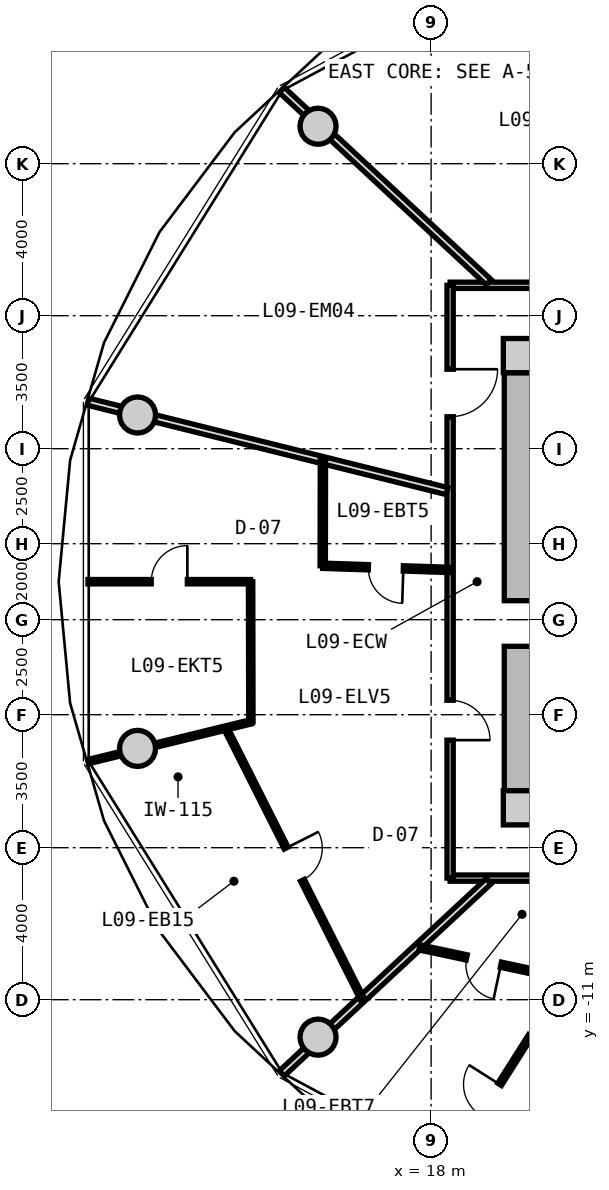
"""IFC4 building model, lengths in metres.
Left out: names, types, materials, properties, quantities, classifications, styles, units other than length and angle.
Written with IfcOpenShell. Run it as: python <this file> out.ifc"""

import sys

from ifc_helpers import new_model, si_unit, direction, frame, frame_2d, origin, origin_2d, place, context, subcontext, project, spatial, rectangle, circle, extrude, source, transform, mapped, element, fill, save


model = new_model("IFC4")
c1 = context("Model", 3, precision=1e-05, world=origin(), true_north=direction((0.0, 1.0)))
c2 = subcontext(c1, "Body", "Model", "MODEL_VIEW")
j1 = project(units=[si_unit("LENGTHUNIT", "METRE"), si_unit("PLANEANGLEUNIT", "RADIAN")], contexts=[c1])
p1 = place(None, origin())
s1 = spatial("IfcSite", under=j1, at=p1, CompositionType="ELEMENT")
p2 = place(p1, origin())
s2 = spatial("IfcBuilding", under=s1, at=p2, CompositionType="ELEMENT")
p3 = place(p2, frame((0.0, 0.0, 33.8)))
s3 = spatial("IfcBuildingStorey", under=s2, at=p3, CompositionType="ELEMENT", Elevation=33.8)
m1 = source(origin(), c2, "Body", "SweptSolid", [
    extrude(rectangle(XDim=0.9, YDim=0.9, at=origin_2d()), origin(), (0.0, 0.0, 1.0), 3.05),
])
for number, where, z_axis, x_axis in (
    (1, (20.35, -5.95, 0.0), (0.0, 0.0, 1.0), (1.0, 0.0, 0.0)),
    (2, (20.35, 5.95, 0.0), (0.0, 0.0, 1.0), (1.0, 0.0, 0.0)),
):
    element("IfcColumn", number, at=place(p3, frame(where, z_axis=z_axis, x_axis=x_axis)), inside=s3, PredefinedType="COLUMN", context=c2, shape_type="MappedRepresentation", body=[
        mapped(m1, transform((0.0, 0.0, 0.0), x_axis=(1.0, 0.0, 0.0), y_axis=(0.0, 1.0, 0.0), z_axis=(0.0, 0.0, 1.0), scale=1.0)),
    ])
m2 = source(origin(), c2, "Body", "SweptSolid", [
    extrude(rectangle(XDim=11.0, YDim=0.85, at=frame_2d((5.5, 0.0))), origin(), (0.0, 0.0, 1.0), 2.79),
])
p4 = place(p3, frame((20.35, -5.5, 0.0), z_axis=(0.0, 0.0, 1.0), x_axis=(0.0, 1.0, 0.0)))
e3 = element("IfcWall", 3, at=p4, inside=s3, PredefinedType="SHEAR", context=c2, shape_type="MappedRepresentation", body=[
    mapped(m2, transform((0.0, 0.0, 0.0), x_axis=(1.0, 0.0, 0.0), y_axis=(0.0, 1.0, 0.0), z_axis=(0.0, 0.0, 1.0), scale=1.0)),
])
p5 = place(p4, frame((3.8, 0.0, 0.0)))
e4 = element("IfcOpeningElement", 4, at=p5, cuts=e3, PredefinedType="OPENING", context=c2, shape_type="SweptSolid", body=[
    extrude(rectangle(XDim=1.2, YDim=2.15, at=frame_2d((0.6, 1.075))), frame((0.0, 0.435, 0.0), z_axis=(0.0, -1.0, 0.0), x_axis=(1.0, 0.0, 0.0)), (0.0, 0.0, 1.0), 0.87),
])
m3 = source(origin(), c2, "Body", "SweptSolid", [
    extrude(circle(Radius=0.475, at=origin_2d()), origin(), (0.0, 0.0, 1.0), 3.05),
])
for number, where, z_axis, x_axis in (
    (5, (15.025, 11.985, 0.0), (0.0, 0.0, 1.0), (1.0, 0.0, 0.0)),
    (6, (10.275, 4.387, 0.0), (0.0, 0.0, 1.0), (1.0, 0.0, 0.0)),
    (7, (10.275, -4.387, 0.0), (0.0, 0.0, 1.0), (1.0, 0.0, 0.0)),
    (8, (15.025, -11.985, 0.0), (0.0, 0.0, 1.0), (1.0, 0.0, 0.0)),
):
    element("IfcColumn", number, at=place(p3, frame(where, z_axis=z_axis, x_axis=x_axis)), inside=s3, PredefinedType="COLUMN", context=c2, shape_type="MappedRepresentation", body=[
        mapped(m3, transform((0.0, 0.0, 0.0), x_axis=(1.0, 0.0, 0.0), y_axis=(0.0, 1.0, 0.0), z_axis=(0.0, 0.0, 1.0), scale=1.0)),
    ])
m4 = source(origin(), c2, "Body", "SweptSolid", [
    extrude(rectangle(XDim=19.0, YDim=0.165, at=frame_2d((9.5, 0.0))), origin(), (0.0, 0.0, 1.0), 2.775),
])
p6 = place(p3, frame((18.5, 7.8, 0.0), z_axis=(0.0, 0.0, 1.0), x_axis=(1.0, 0.0, 0.0)))
e9 = element("IfcWall", 9, at=p6, inside=s3, PredefinedType="PARTITIONING", context=c2, shape_type="MappedRepresentation", body=[
    mapped(m4, transform((0.0, 0.0, 0.0), x_axis=(1.0, 0.0, 0.0), y_axis=(0.0, 1.0, 0.0), z_axis=(0.0, 0.0, 1.0), scale=1.0)),
])
p7 = place(p6, frame((10.523, 0.0, 0.0)))
e10 = element("IfcOpeningElement", 10, at=p7, cuts=e9, PredefinedType="OPENING", context=c2, shape_type="SweptSolid", body=[
    extrude(rectangle(XDim=0.92, YDim=2.1, at=frame_2d((0.46, 1.05))), frame((0.0, 0.093, 0.0), z_axis=(0.0, -1.0, 0.0), x_axis=(1.0, 0.0, 0.0)), (0.0, 0.0, 1.0), 0.185),
])
p8 = place(p6, frame((8.226, 0.0, 0.0)))
e11 = element("IfcOpeningElement", 11, at=p8, cuts=e9, PredefinedType="OPENING", context=c2, shape_type="SweptSolid", body=[
    extrude(rectangle(XDim=0.92, YDim=2.1, at=frame_2d((0.46, 1.05))), frame((0.0, 0.093, 0.0), z_axis=(0.0, -1.0, 0.0), x_axis=(1.0, 0.0, 0.0)), (0.0, 0.0, 1.0), 0.185),
])
p9 = place(p6, frame((3.506, 0.0, 0.0)))
e12 = element("IfcOpeningElement", 12, at=p9, cuts=e9, PredefinedType="OPENING", context=c2, shape_type="SweptSolid", body=[
    extrude(rectangle(XDim=1.25, YDim=2.2, at=frame_2d((0.625, 1.1))), frame((0.0, 0.093, 0.0), z_axis=(0.0, -1.0, 0.0), x_axis=(1.0, 0.0, 0.0)), (0.0, 0.0, 1.0), 0.185),
])
p10 = place(p6, frame((12.706, 0.0, 0.0)))
e13 = element("IfcOpeningElement", 13, at=p10, cuts=e9, PredefinedType="OPENING", context=c2, shape_type="SweptSolid", body=[
    extrude(rectangle(XDim=1.05, YDim=2.15, at=frame_2d((0.525, 1.075))), frame((0.0, 0.093, 0.0), z_axis=(0.0, -1.0, 0.0), x_axis=(1.0, 0.0, 0.0)), (0.0, 0.0, 1.0), 0.185),
])
p11 = place(p3, frame((37.5, -7.8, 0.0), z_axis=(0.0, 0.0, 1.0), x_axis=(-1.0, 0.0, 0.0)))
e14 = element("IfcWall", 14, at=p11, inside=s3, PredefinedType="PARTITIONING", context=c2, shape_type="MappedRepresentation", body=[
    mapped(m4, transform((0.0, 0.0, 0.0), x_axis=(1.0, 0.0, 0.0), y_axis=(0.0, 1.0, 0.0), z_axis=(0.0, 0.0, 1.0), scale=1.0)),
])
p12 = place(p11, frame((7.336, 0.0, 0.0)))
e15 = element("IfcOpeningElement", 15, at=p12, cuts=e14, PredefinedType="OPENING", context=c2, shape_type="SweptSolid", body=[
    extrude(rectangle(XDim=1.05, YDim=2.15, at=frame_2d((0.525, 1.075))), frame((0.0, 0.093, 0.0), z_axis=(0.0, -1.0, 0.0), x_axis=(1.0, 0.0, 0.0)), (0.0, 0.0, 1.0), 0.185),
])
m5 = source(origin(), c2, "Body", "SweptSolid", [
    extrude(rectangle(XDim=15.6, YDim=0.165, at=frame_2d((7.8, 0.0))), origin(), (0.0, 0.0, 1.0), 2.775),
])
p13 = place(p3, frame((18.5, -7.8, 0.0), z_axis=(0.0, 0.0, 1.0), x_axis=(0.0, 1.0, 0.0)))
e16 = element("IfcWall", 16, at=p13, inside=s3, PredefinedType="PARTITIONING", context=c2, shape_type="MappedRepresentation", body=[
    mapped(m5, transform((0.0, 0.0, 0.0), x_axis=(1.0, 0.0, 0.0), y_axis=(0.0, 1.0, 0.0), z_axis=(0.0, 0.0, 1.0), scale=1.0)),
])
p14 = place(p13, frame((12.141, 0.0, 0.0)))
e17 = element("IfcOpeningElement", 17, at=p14, cuts=e16, PredefinedType="OPENING", context=c2, shape_type="SweptSolid", body=[
    extrude(rectangle(XDim=1.25, YDim=2.2, at=frame_2d((0.625, 1.1))), frame((0.0, 0.093, 0.0), z_axis=(0.0, -1.0, 0.0), x_axis=(1.0, 0.0, 0.0)), (0.0, 0.0, 1.0), 0.185),
])
p15 = place(p13, frame((3.63, 0.0, 0.0)))
e18 = element("IfcOpeningElement", 18, at=p15, cuts=e16, PredefinedType="OPENING", context=c2, shape_type="SweptSolid", body=[
    extrude(rectangle(XDim=1.05, YDim=2.15, at=frame_2d((0.525, 1.075))), frame((0.0, 0.093, 0.0), z_axis=(0.0, -1.0, 0.0), x_axis=(1.0, 0.0, 0.0)), (0.0, 0.0, 1.0), 0.185),
])
m6 = source(origin(), c2, "Body", "SweptSolid", [
    extrude(rectangle(XDim=7.435, YDim=0.19, at=frame_2d((3.717, 0.0))), origin(), (0.0, 0.0, 1.0), 2.225),
])
p16 = place(p3, frame((19.517, 7.88, 0.0), z_axis=(0.0, 0.0, 1.0), x_axis=(-0.732651956848, 0.680603489652, 0.0)))
e19 = element("IfcWall", 19, at=p16, inside=s3, PredefinedType="PARTITIONING", context=c2, shape_type="MappedRepresentation", body=[
    mapped(m6, transform((0.0, 0.0, 0.0), x_axis=(1.0, 0.0, 0.0), y_axis=(0.0, 1.0, 0.0), z_axis=(0.0, 0.0, 1.0), scale=1.0)),
])
m7 = source(origin(), c2, "Body", "SweptSolid", [
    extrude(rectangle(XDim=9.737, YDim=0.19, at=frame_2d((4.869, 0.0))), origin(), (0.0, 0.0, 1.0), 2.225),
])
p17 = place(p3, frame((18.42, 2.385, 0.0), z_axis=(0.0, 0.0, 1.0), x_axis=(-0.970392716238, 0.241532557375, 0.0)))
e20 = element("IfcWall", 20, at=p17, inside=s3, PredefinedType="PARTITIONING", context=c2, shape_type="MappedRepresentation", body=[
    mapped(m7, transform((0.0, 0.0, 0.0), x_axis=(1.0, 0.0, 0.0), y_axis=(0.0, 1.0, 0.0), z_axis=(0.0, 0.0, 1.0), scale=1.0)),
])
p18 = place(p3, frame((19.517, -7.88, 0.0), z_axis=(0.0, 0.0, 1.0), x_axis=(-0.732651956848, -0.680603489652, 0.0)))
e21 = element("IfcWall", 21, at=p18, inside=s3, PredefinedType="PARTITIONING", context=c2, shape_type="MappedRepresentation", body=[
    mapped(m6, transform((0.0, 0.0, 0.0), x_axis=(1.0, 0.0, 0.0), y_axis=(0.0, 1.0, 0.0), z_axis=(0.0, 0.0, 1.0), scale=1.0)),
])
m8 = source(origin(), c2, "Body", "SweptSolid", [
    extrude(rectangle(XDim=8.018, YDim=0.115, at=frame_2d((4.009, 0.0))), origin(), (0.0, 0.0, 1.0), 2.775),
])
p19 = place(p3, frame((12.596, -3.854, 0.0), z_axis=(0.0, 0.0, 1.0), x_axis=(0.450134355233, -0.89296084026, 0.0)))
e22 = element("IfcWall", 22, at=p19, inside=s3, PredefinedType="PARTITIONING", context=c2, shape_type="MappedRepresentation", body=[
    mapped(m8, transform((0.0, 0.0, 0.0), x_axis=(1.0, 0.0, 0.0), y_axis=(0.0, 1.0, 0.0), z_axis=(0.0, 0.0, 1.0), scale=1.0)),
])
p20 = place(p19, frame((3.534, 0.0, 0.0)))
e23 = element("IfcOpeningElement", 23, at=p20, cuts=e22, PredefinedType="OPENING", context=c2, shape_type="SweptSolid", body=[
    extrude(rectangle(XDim=0.95, YDim=2.1, at=frame_2d((0.475, 1.05))), frame((0.0, 0.067, 0.0), z_axis=(0.0, -1.0, 0.0), x_axis=(1.0, 0.0, 0.0)), (0.0, 0.0, 1.0), 0.135),
])
m9 = source(origin(), c2, "Body", "SweptSolid", [
    extrude(rectangle(XDim=4.414, YDim=0.115, at=frame_2d((2.207, 0.0))), origin(), (0.0, 0.0, 1.0), 2.225),
])
p21 = place(p3, frame((13.259, -3.688, 0.0), z_axis=(0.0, 0.0, 1.0), x_axis=(-0.971401274504, -0.237443812073, 0.0)))
e24 = element("IfcWall", 24, at=p21, inside=s3, PredefinedType="PARTITIONING", context=c2, shape_type="MappedRepresentation", body=[
    mapped(m9, transform((0.0, 0.0, 0.0), x_axis=(1.0, 0.0, 0.0), y_axis=(0.0, 1.0, 0.0), z_axis=(0.0, 0.0, 1.0), scale=1.0)),
])
m10 = source(origin(), c2, "Body", "SweptSolid", [
    extrude(rectangle(XDim=3.323, YDim=0.14, at=frame_2d((1.662, 0.0))), origin(), (0.0, 0.0, 1.0), 2.775),
])
p22 = place(p3, frame((18.47, 0.311, 0.0), z_axis=(0.0, 0.0, 1.0), x_axis=(-0.999467979553, 0.032615300817, 0.0)))
e25 = element("IfcWall", 25, at=p22, inside=s3, PredefinedType="PARTITIONING", context=c2, shape_type="MappedRepresentation", body=[
    mapped(m10, transform((0.0, 0.0, 0.0), x_axis=(1.0, 0.0, 0.0), y_axis=(0.0, 1.0, 0.0), z_axis=(0.0, 0.0, 1.0), scale=1.0)),
])
p23 = place(p22, frame((1.202, 0.0, 0.0)))
e26 = element("IfcOpeningElement", 26, at=p23, cuts=e25, PredefinedType="OPENING", context=c2, shape_type="SweptSolid", body=[
    extrude(rectangle(XDim=0.92, YDim=2.1, at=frame_2d((0.46, 1.05))), frame((0.0, 0.08, 0.0), z_axis=(0.0, -1.0, 0.0), x_axis=(1.0, 0.0, 0.0)), (0.0, 0.0, 1.0), 0.16),
])
m11 = source(origin(), c2, "Body", "SweptSolid", [
    extrude(rectangle(XDim=2.795, YDim=0.14, at=frame_2d((1.397, 0.0))), origin(), (0.0, 0.0, 1.0), 2.775),
])
p24 = place(p3, frame((15.148, 0.419, 0.0), z_axis=(0.0, 0.0, 1.0), x_axis=(0.001659531299, 0.999998622977, 0.0)))
e27 = element("IfcWall", 27, at=p24, inside=s3, PredefinedType="PARTITIONING", context=c2, shape_type="MappedRepresentation", body=[
    mapped(m11, transform((0.0, 0.0, 0.0), x_axis=(1.0, 0.0, 0.0), y_axis=(0.0, 1.0, 0.0), z_axis=(0.0, 0.0, 1.0), scale=1.0)),
])
m12 = source(origin(), c2, "Body", "SweptSolid", [
    extrude(rectangle(XDim=4.279, YDim=0.115, at=frame_2d((2.139, 0.0))), origin(), (0.0, 0.0, 1.0), 2.775),
])
p25 = place(p3, frame((13.25, 0.0, 0.0), z_axis=(0.0, 0.0, 1.0), x_axis=(-1.0, 0.0, 0.0)))
e28 = element("IfcWall", 28, at=p25, inside=s3, PredefinedType="PARTITIONING", context=c2, shape_type="MappedRepresentation", body=[
    mapped(m12, transform((0.0, 0.0, 0.0), x_axis=(1.0, 0.0, 0.0), y_axis=(0.0, 1.0, 0.0), z_axis=(0.0, 0.0, 1.0), scale=1.0)),
])
p26 = place(p25, frame((1.664, 0.0, 0.0)))
e29 = element("IfcOpeningElement", 29, at=p26, cuts=e28, PredefinedType="OPENING", context=c2, shape_type="SweptSolid", body=[
    extrude(rectangle(XDim=0.95, YDim=2.1, at=frame_2d((0.475, 1.05))), frame((0.0, 0.067, 0.0), z_axis=(0.0, -1.0, 0.0), x_axis=(1.0, 0.0, 0.0)), (0.0, 0.0, 1.0), 0.135),
])
m13 = source(origin(), c2, "Body", "SweptSolid", [
    extrude(rectangle(XDim=3.689, YDim=0.115, at=frame_2d((1.844, 0.0))), origin(), (0.0, 0.0, 1.0), 2.775),
])
p27 = place(p3, frame((13.25, 0.0, 0.0), z_axis=(0.0, 0.0, 1.0), x_axis=(0.001919382261, -0.999998157984, 0.0)))
e30 = element("IfcWall", 30, at=p27, inside=s3, PredefinedType="PARTITIONING", context=c2, shape_type="MappedRepresentation", body=[
    mapped(m13, transform((0.0, 0.0, 0.0), x_axis=(1.0, 0.0, 0.0), y_axis=(0.0, 1.0, 0.0), z_axis=(0.0, 0.0, 1.0), scale=1.0)),
])
m14 = source(origin(), c2, "Body", "SweptSolid", [
    extrude(rectangle(XDim=3.459, YDim=0.14, at=frame_2d((1.729, 0.0))), origin(), (0.0, 0.0, 1.0), 2.775),
])
p28 = place(p3, frame((21.078, -10.344, 0.0), z_axis=(0.0, 0.0, 1.0), x_axis=(-0.978006468578, 0.208574560815, 0.0)))
e31 = element("IfcWall", 31, at=p28, inside=s3, PredefinedType="PARTITIONING", context=c2, shape_type="MappedRepresentation", body=[
    mapped(m14, transform((0.0, 0.0, 0.0), x_axis=(1.0, 0.0, 0.0), y_axis=(0.0, 1.0, 0.0), z_axis=(0.0, 0.0, 1.0), scale=1.0)),
])
p29 = place(p28, frame((1.27, 0.0, 0.0)))
e32 = element("IfcOpeningElement", 32, at=p29, cuts=e31, PredefinedType="OPENING", context=c2, shape_type="SweptSolid", body=[
    extrude(rectangle(XDim=0.92, YDim=2.1, at=frame_2d((0.46, 1.05))), frame((0.0, 0.08, 0.0), z_axis=(0.0, -1.0, 0.0), x_axis=(1.0, 0.0, 0.0)), (0.0, 0.0, 1.0), 0.16),
])
m15 = source(origin(), c2, "Body", "SweptSolid", [
    extrude(rectangle(XDim=3.974, YDim=0.115, at=frame_2d((1.987, 0.0))), origin(), (0.0, 0.0, 1.0), 2.775),
])
p30 = place(p3, frame((20.611, -11.95, 0.0), z_axis=(0.0, 0.0, 1.0), x_axis=(-0.534810918023, -0.844971764003, 0.0)))
e33 = element("IfcWall", 33, at=p30, inside=s3, PredefinedType="PARTITIONING", context=c2, shape_type="MappedRepresentation", body=[
    mapped(m15, transform((0.0, 0.0, 0.0), x_axis=(1.0, 0.0, 0.0), y_axis=(0.0, 1.0, 0.0), z_axis=(0.0, 0.0, 1.0), scale=1.0)),
])
p31 = place(p30, frame((1.512, 0.0, 0.0)))
e34 = element("IfcOpeningElement", 34, at=p31, cuts=e33, PredefinedType="OPENING", context=c2, shape_type="SweptSolid", body=[
    extrude(rectangle(XDim=0.95, YDim=2.1, at=frame_2d((0.475, 1.05))), frame((0.0, 0.067, 0.0), z_axis=(0.0, -1.0, 0.0), x_axis=(1.0, 0.0, 0.0)), (0.0, 0.0, 1.0), 0.135),
])
m16 = source(origin(), c2, "Body", "SweptSolid", [
    extrude(rectangle(XDim=1.2, YDim=2.15, at=frame_2d((0.6, 1.075))), frame((0.0, 0.025, 0.0), z_axis=(0.0, -1.0, 0.0), x_axis=(1.0, 0.0, 0.0)), (0.0, 0.0, 1.0), 0.05),
])
p32 = place(p5, frame((1.2, 0.0, 0.0), z_axis=(0.0, 0.0, 1.0), x_axis=(-1.0, 0.0, 0.0)))
e35 = element("IfcDoor", 35, at=p32, inside=s3, OperationType="SINGLE_SWING_LEFT", PredefinedType="DOOR", context=c2, shape_type="MappedRepresentation", body=[
    mapped(m16, transform((0.0, 0.0, 0.0), x_axis=(1.0, 0.0, 0.0), y_axis=(0.0, 1.0, 0.0), z_axis=(0.0, 0.0, 1.0), scale=1.0)),
])
fill(e4, e35)
m17 = source(origin(), c2, "Body", "SweptSolid", [
    extrude(rectangle(XDim=1.25, YDim=2.2, at=frame_2d((0.625, 1.1))), frame((0.0, 0.025, 0.0), z_axis=(0.0, -1.0, 0.0), x_axis=(1.0, 0.0, 0.0)), (0.0, 0.0, 1.0), 0.05),
])
p33 = place(p14, frame((1.25, 0.0, 0.0), z_axis=(0.0, 0.0, 1.0), x_axis=(-1.0, 0.0, 0.0)))
e36 = element("IfcDoor", 36, at=p33, inside=s3, OperationType="SINGLE_SWING_LEFT", PredefinedType="DOOR", context=c2, shape_type="MappedRepresentation", body=[
    mapped(m17, transform((0.0, 0.0, 0.0), x_axis=(1.0, 0.0, 0.0), y_axis=(0.0, 1.0, 0.0), z_axis=(0.0, 0.0, 1.0), scale=1.0)),
])
fill(e17, e36)
m18 = source(origin(), c2, "Body", "SweptSolid", [
    extrude(rectangle(XDim=1.05, YDim=2.15, at=frame_2d((0.525, 1.075))), frame((0.0, 0.025, 0.0), z_axis=(0.0, -1.0, 0.0), x_axis=(1.0, 0.0, 0.0)), (0.0, 0.0, 1.0), 0.05),
])
p34 = place(p15, frame((1.05, 0.0, 0.0), z_axis=(0.0, 0.0, 1.0), x_axis=(-1.0, 0.0, 0.0)))
e37 = element("IfcDoor", 37, at=p34, inside=s3, OperationType="SINGLE_SWING_RIGHT", PredefinedType="DOOR", context=c2, shape_type="MappedRepresentation", body=[
    mapped(m18, transform((0.0, 0.0, 0.0), x_axis=(1.0, 0.0, 0.0), y_axis=(0.0, 1.0, 0.0), z_axis=(0.0, 0.0, 1.0), scale=1.0)),
])
fill(e18, e37)
m19 = source(origin(), c2, "Body", "SweptSolid", [
    extrude(rectangle(XDim=0.92, YDim=2.1, at=frame_2d((0.46, 1.05))), frame((0.0, 0.025, 0.0), z_axis=(0.0, -1.0, 0.0), x_axis=(1.0, 0.0, 0.0)), (0.0, 0.0, 1.0), 0.05),
])
p35 = place(p23, origin())
e38 = element("IfcDoor", 38, at=p35, inside=s3, OperationType="SINGLE_SWING_LEFT", PredefinedType="DOOR", context=c2, shape_type="MappedRepresentation", body=[
    mapped(m19, transform((0.0, 0.0, 0.0), x_axis=(1.0, 0.0, 0.0), y_axis=(0.0, 1.0, 0.0), z_axis=(0.0, 0.0, 1.0), scale=1.0)),
])
fill(e26, e38)
m20 = source(origin(), c2, "Body", "SweptSolid", [
    extrude(rectangle(XDim=0.95, YDim=2.1, at=frame_2d((0.475, 1.05))), frame((0.0, 0.025, 0.0), z_axis=(0.0, -1.0, 0.0), x_axis=(1.0, 0.0, 0.0)), (0.0, 0.0, 1.0), 0.05),
])
p36 = place(p26, frame((0.95, 0.0, 0.0), z_axis=(0.0, 0.0, 1.0), x_axis=(-1.0, 0.0, 0.0)))
e39 = element("IfcDoor", 39, at=p36, inside=s3, OperationType="SINGLE_SWING_RIGHT", PredefinedType="DOOR", context=c2, shape_type="MappedRepresentation", body=[
    mapped(m20, transform((0.0, 0.0, 0.0), x_axis=(1.0, 0.0, 0.0), y_axis=(0.0, 1.0, 0.0), z_axis=(0.0, 0.0, 1.0), scale=1.0)),
])
fill(e29, e39)
p37 = place(p20, origin())
e40 = element("IfcDoor", 40, at=p37, inside=s3, OperationType="SINGLE_SWING_LEFT", PredefinedType="DOOR", context=c2, shape_type="MappedRepresentation", body=[
    mapped(m20, transform((0.0, 0.0, 0.0), x_axis=(1.0, 0.0, 0.0), y_axis=(0.0, 1.0, 0.0), z_axis=(0.0, 0.0, 1.0), scale=1.0)),
])
fill(e23, e40)
p38 = place(p29, origin())
e41 = element("IfcDoor", 41, at=p38, inside=s3, OperationType="SINGLE_SWING_LEFT", PredefinedType="DOOR", context=c2, shape_type="MappedRepresentation", body=[
    mapped(m19, transform((0.0, 0.0, 0.0), x_axis=(1.0, 0.0, 0.0), y_axis=(0.0, 1.0, 0.0), z_axis=(0.0, 0.0, 1.0), scale=1.0)),
])
fill(e32, e41)
p39 = place(p31, frame((0.95, 0.0, 0.0), z_axis=(0.0, 0.0, 1.0), x_axis=(-1.0, 0.0, 0.0)))
e42 = element("IfcDoor", 42, at=p39, inside=s3, OperationType="SINGLE_SWING_RIGHT", PredefinedType="DOOR", context=c2, shape_type="MappedRepresentation", body=[
    mapped(m20, transform((0.0, 0.0, 0.0), x_axis=(1.0, 0.0, 0.0), y_axis=(0.0, 1.0, 0.0), z_axis=(0.0, 0.0, 1.0), scale=1.0)),
])
fill(e34, e42)
save(model, sys.argv[1])
